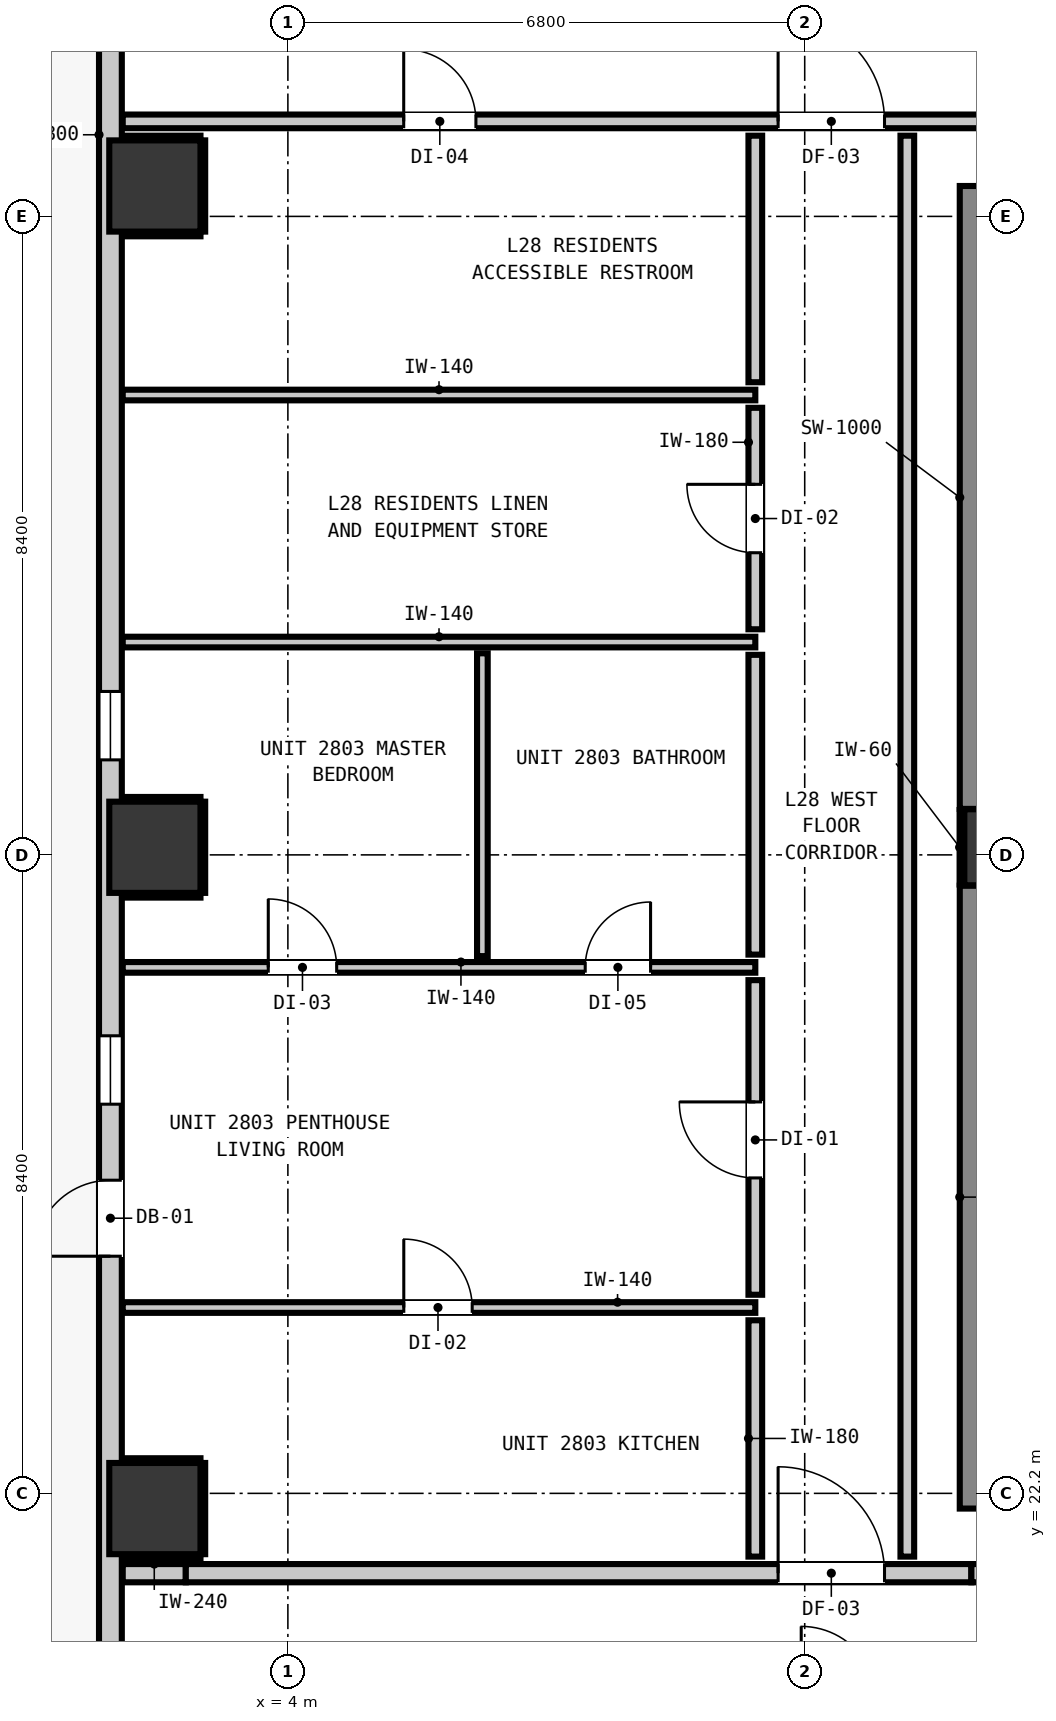
"""IFC4 building model, lengths in metres.
Left out: names, types, materials, properties, quantities, classifications, styles, units other than length and angle.
Written with IfcOpenShell. Run it as: python <this file> out.ifc"""

import sys

from ifc_helpers import new_model, si_unit, direction, frame, frame_2d, origin, origin_2d, place, context, subcontext, project, spatial, rectangle, extrude, element, fill, save


model = new_model("IFC4")
c1 = context("Model", 3, precision=1e-05, world=origin(), true_north=direction((0.0, 1.0)))
c2 = subcontext(c1, "Body", "Model", "MODEL_VIEW")
j1 = project(units=[si_unit("LENGTHUNIT", "METRE"), si_unit("PLANEANGLEUNIT", "RADIAN")], contexts=[c1])
p1 = place(None, origin())
s1 = spatial("IfcSite", under=j1, at=p1, CompositionType="ELEMENT")
p2 = place(p1, origin())
s2 = spatial("IfcBuilding", under=s1, at=p2, CompositionType="ELEMENT")
p3 = place(p2, frame((0.0, 0.0, 99.44)))
s3 = spatial("IfcBuildingStorey", under=s2, at=p3, CompositionType="ELEMENT", Elevation=99.44)
p4 = place(p3, frame((13.4, 30.7, 0.0), z_axis=(0.0, 0.0, 1.0), x_axis=(1.0, 0.0, 0.0)))
e1 = element("IfcColumn", 1, at=p4, inside=s3, PredefinedType="COLUMN", context=c2, shape_type="SweptSolid", body=[
    extrude(rectangle(XDim=1.0, YDim=1.0, at=origin_2d()), origin(), (0.0, 0.0, 1.0), 3.32),
])
p5 = place(p3, frame((13.34, 22.0, 0.0), z_axis=(0.0, 0.0, 1.0), x_axis=(0.0, 1.0, 0.0)))
e2 = element("IfcWall", 2, at=p5, inside=s3, PredefinedType="SHEAR", context=c2, shape_type="SweptSolid", body=[
    extrude(rectangle(XDim=8.195, YDim=1.0, at=frame_2d((4.098, 0.0))), origin(), (0.0, 0.0, 1.0), 3.32),
])
p6 = place(p3, frame((13.34, 31.205, 0.0), z_axis=(0.0, 0.0, 1.0), x_axis=(0.0, 1.0, 0.0)))
e3 = element("IfcWall", 3, at=p6, inside=s3, PredefinedType="SHEAR", context=c2, shape_type="SweptSolid", body=[
    extrude(rectangle(XDim=8.195, YDim=1.0, at=frame_2d((4.097, 0.0))), origin(), (0.0, 0.0, 1.0), 3.32),
])
for number, where, z_axis, x_axis in (
    (4, (2.25, 22.0, 0.0), (0.0, 0.0, 1.0), (1.0, 0.0, 0.0)),
    (5, (2.25, 30.7, 0.0), (0.0, 0.0, 1.0), (1.0, 0.0, 0.0)),
    (6, (2.25, 39.4, 0.0), (0.0, 0.0, 1.0), (1.0, 0.0, 0.0)),
):
    element("IfcColumn", number, at=place(p3, frame(where, z_axis=z_axis, x_axis=x_axis)), inside=s3, PredefinedType="COLUMN", context=c2, shape_type="SweptSolid", body=[
        extrude(rectangle(XDim=1.2, YDim=1.2, at=origin_2d()), origin(), (0.0, 0.0, 1.0), 3.32),
    ])
p7 = place(p3, frame((1.665, 16.365, 0.0), z_axis=(0.0, 0.0, 1.0), x_axis=(0.0, 1.0, 0.0)))
e7 = element("IfcWall", 7, at=p7, inside=s3, PredefinedType="STANDARD", context=c2, shape_type="SweptSolid", body=[
    extrude(rectangle(XDim=34.67, YDim=0.3, at=frame_2d((17.335, 0.0))), origin(), (0.0, 0.0, 1.0), 3.06),
])
p8 = place(p7, frame((8.955, 0.0, 0.0)))
e8 = element("IfcOpeningElement", 8, at=p8, cuts=e7, PredefinedType="OPENING", context=c2, shape_type="SweptSolid", body=[
    extrude(rectangle(XDim=1.0, YDim=2.15, at=frame_2d((0.5, 1.075))), frame((0.0, 0.16, 0.0), z_axis=(0.0, -1.0, 0.0), x_axis=(1.0, 0.0, 0.0)), (0.0, 0.0, 1.0), 0.32),
])
p9 = place(p7, frame((31.033, 0.0, 0.85)))
e9 = element("IfcOpeningElement", 9, at=p9, cuts=e7, PredefinedType="OPENING", context=c2, shape_type="SweptSolid", body=[
    extrude(rectangle(XDim=0.9, YDim=1.5, at=frame_2d((0.45, 0.75))), frame((0.0, 0.16, 0.0), z_axis=(0.0, -1.0, 0.0), x_axis=(1.0, 0.0, 0.0)), (0.0, 0.0, 1.0), 0.32),
])
p10 = place(p7, frame((10.955, 0.0, 0.85)))
e10 = element("IfcOpeningElement", 10, at=p10, cuts=e7, PredefinedType="OPENING", context=c2, shape_type="SweptSolid", body=[
    extrude(rectangle(XDim=0.9, YDim=1.5, at=frame_2d((0.45, 0.75))), frame((0.0, 0.16, 0.0), z_axis=(0.0, -1.0, 0.0), x_axis=(1.0, 0.0, 0.0)), (0.0, 0.0, 1.0), 0.32),
])
p11 = place(p7, frame((15.485, 0.0, 0.85)))
e11 = element("IfcOpeningElement", 11, at=p11, cuts=e7, PredefinedType="OPENING", context=c2, shape_type="SweptSolid", body=[
    extrude(rectangle(XDim=0.9, YDim=1.5, at=frame_2d((0.45, 0.75))), frame((0.0, 0.16, 0.0), z_axis=(0.0, -1.0, 0.0), x_axis=(1.0, 0.0, 0.0)), (0.0, 0.0, 1.0), 0.32),
])
p12 = place(p3, frame((1.827, 21.15, 0.0), z_axis=(0.0, 0.0, 1.0), x_axis=(1.0, 0.0, 0.0)))
e12 = element("IfcWall", 12, at=p12, inside=s3, PredefinedType="PARTITIONING", context=c2, shape_type="SweptSolid", body=[
    extrude(rectangle(XDim=0.83, YDim=0.24, at=frame_2d((0.415, 0.0))), origin(), (0.0, 0.0, 1.0), 3.06),
])
p13 = place(p3, frame((2.657, 21.15, 0.0), z_axis=(0.0, 0.0, 1.0), x_axis=(1.0, 0.0, 0.0)))
e13 = element("IfcWall", 13, at=p13, inside=s3, PredefinedType="PARTITIONING", context=c2, shape_type="SweptSolid", body=[
    extrude(rectangle(XDim=10.336, YDim=0.24, at=frame_2d((5.168, 0.0))), origin(), (0.0, 0.0, 1.0), 2.445),
])
p14 = place(p13, frame((7.793, 0.0, 0.0)))
e14 = element("IfcOpeningElement", 14, at=p14, cuts=e13, PredefinedType="OPENING", context=c2, shape_type="SweptSolid", body=[
    extrude(rectangle(XDim=1.4, YDim=2.15, at=frame_2d((0.7, 1.075))), frame((0.0, 0.13, 0.0), z_axis=(0.0, -1.0, 0.0), x_axis=(1.0, 0.0, 0.0)), (0.0, 0.0, 1.0), 0.26),
])
p15 = place(p3, frame((12.993, 21.15, 0.0), z_axis=(0.0, 0.0, 1.0), x_axis=(1.0, 0.0, 0.0)))
e15 = element("IfcWall", 15, at=p15, inside=s3, PredefinedType="PARTITIONING", context=c2, shape_type="SweptSolid", body=[
    extrude(rectangle(XDim=30.98, YDim=0.24, at=frame_2d((15.49, 0.0))), origin(), (0.0, 0.0, 1.0), 3.06),
])
p16 = place(p15, frame((5.217, 0.0, 0.0)))
e16 = element("IfcOpeningElement", 16, at=p16, cuts=e15, PredefinedType="OPENING", context=c2, shape_type="SweptSolid", body=[
    extrude(rectangle(XDim=1.1, YDim=2.15, at=frame_2d((0.55, 1.075))), frame((0.0, 0.13, 0.0), z_axis=(0.0, -1.0, 0.0), x_axis=(1.0, 0.0, 0.0)), (0.0, 0.0, 1.0), 0.26),
])
p17 = place(p15, frame((25.057, 0.0, 0.0)))
e17 = element("IfcOpeningElement", 17, at=p17, cuts=e15, PredefinedType="OPENING", context=c2, shape_type="SweptSolid", body=[
    extrude(rectangle(XDim=1.4, YDim=2.15, at=frame_2d((0.7, 1.075))), frame((0.0, 0.13, 0.0), z_axis=(0.0, -1.0, 0.0), x_axis=(1.0, 0.0, 0.0)), (0.0, 0.0, 1.0), 0.26),
])
p18 = place(p3, frame((1.827, 40.25, 0.0), z_axis=(0.0, 0.0, 1.0), x_axis=(1.0, 0.0, 0.0)))
e18 = element("IfcWall", 18, at=p18, inside=s3, PredefinedType="PARTITIONING", context=c2, shape_type="SweptSolid", body=[
    extrude(rectangle(XDim=42.146, YDim=0.18, at=frame_2d((21.073, 0.0))), origin(), (0.0, 0.0, 1.0), 3.06),
])
p19 = place(p18, frame((15.608, 0.0, 0.0)))
e19 = element("IfcOpeningElement", 19, at=p19, cuts=e18, PredefinedType="OPENING", context=c2, shape_type="SweptSolid", body=[
    extrude(rectangle(XDim=1.4, YDim=2.15, at=frame_2d((0.7, 1.075))), frame((0.0, 0.1, 0.0), z_axis=(0.0, -1.0, 0.0), x_axis=(1.0, 0.0, 0.0)), (0.0, 0.0, 1.0), 0.2),
])
p20 = place(p18, frame((8.623, 0.0, 0.0)))
e20 = element("IfcOpeningElement", 20, at=p20, cuts=e18, PredefinedType="OPENING", context=c2, shape_type="SweptSolid", body=[
    extrude(rectangle(XDim=1.4, YDim=2.15, at=frame_2d((0.7, 1.075))), frame((0.0, 0.1, 0.0), z_axis=(0.0, -1.0, 0.0), x_axis=(1.0, 0.0, 0.0)), (0.0, 0.0, 1.0), 0.2),
])
p21 = place(p18, frame((36.223, 0.0, 0.0)))
e21 = element("IfcOpeningElement", 21, at=p21, cuts=e18, PredefinedType="OPENING", context=c2, shape_type="SweptSolid", body=[
    extrude(rectangle(XDim=1.4, YDim=2.15, at=frame_2d((0.7, 1.075))), frame((0.0, 0.1, 0.0), z_axis=(0.0, -1.0, 0.0), x_axis=(1.0, 0.0, 0.0)), (0.0, 0.0, 1.0), 0.2),
])
p22 = place(p18, frame((3.697, 0.0, 0.0)))
e22 = element("IfcOpeningElement", 22, at=p22, cuts=e18, PredefinedType="OPENING", context=c2, shape_type="SweptSolid", body=[
    extrude(rectangle(XDim=0.95, YDim=2.1, at=frame_2d((0.475, 1.05))), frame((0.0, 0.1, 0.0), z_axis=(0.0, -1.0, 0.0), x_axis=(1.0, 0.0, 0.0)), (0.0, 0.0, 1.0), 0.2),
])
p23 = place(p18, frame((39.574, 0.0, 0.0)))
e23 = element("IfcOpeningElement", 23, at=p23, cuts=e18, PredefinedType="OPENING", context=c2, shape_type="SweptSolid", body=[
    extrude(rectangle(XDim=0.9, YDim=2.1, at=frame_2d((0.45, 1.05))), frame((0.0, 0.1, 0.0), z_axis=(0.0, -1.0, 0.0), x_axis=(1.0, 0.0, 0.0)), (0.0, 0.0, 1.0), 0.2),
])
p24 = place(p3, frame((1.827, 24.645, 0.0), z_axis=(0.0, 0.0, 1.0), x_axis=(1.0, 0.0, 0.0)))
e24 = element("IfcWall", 24, at=p24, inside=s3, PredefinedType="PARTITIONING", context=c2, shape_type="SweptSolid", body=[
    extrude(rectangle(XDim=8.323, YDim=0.14, at=frame_2d((4.162, 0.0))), origin(), (0.0, 0.0, 1.0), 3.06),
])
p25 = place(p24, frame((3.698, 0.0, 0.0)))
e25 = element("IfcOpeningElement", 25, at=p25, cuts=e24, PredefinedType="OPENING", context=c2, shape_type="SweptSolid", body=[
    extrude(rectangle(XDim=0.9, YDim=2.1, at=frame_2d((0.45, 1.05))), frame((0.0, 0.08, 0.0), z_axis=(0.0, -1.0, 0.0), x_axis=(1.0, 0.0, 0.0)), (0.0, 0.0, 1.0), 0.16),
])
p26 = place(p3, frame((1.827, 29.12, 0.0), z_axis=(0.0, 0.0, 1.0), x_axis=(1.0, 0.0, 0.0)))
e26 = element("IfcWall", 26, at=p26, inside=s3, PredefinedType="PARTITIONING", context=c2, shape_type="SweptSolid", body=[
    extrude(rectangle(XDim=8.323, YDim=0.14, at=frame_2d((4.162, 0.0))), origin(), (0.0, 0.0, 1.0), 3.06),
])
p27 = place(p26, frame((6.085, 0.0, 0.0)))
e27 = element("IfcOpeningElement", 27, at=p27, cuts=e26, PredefinedType="OPENING", context=c2, shape_type="SweptSolid", body=[
    extrude(rectangle(XDim=0.86, YDim=2.02, at=frame_2d((0.43, 1.01))), frame((0.0, 0.08, 0.0), z_axis=(0.0, -1.0, 0.0), x_axis=(1.0, 0.0, 0.0)), (0.0, 0.0, 1.0), 0.16),
])
p28 = place(p26, frame((1.915, 0.0, 0.0)))
e28 = element("IfcOpeningElement", 28, at=p28, cuts=e26, PredefinedType="OPENING", context=c2, shape_type="SweptSolid", body=[
    extrude(rectangle(XDim=0.9, YDim=2.1, at=frame_2d((0.45, 1.05))), frame((0.0, 0.08, 0.0), z_axis=(0.0, -1.0, 0.0), x_axis=(1.0, 0.0, 0.0)), (0.0, 0.0, 1.0), 0.16),
])
for number, where, z_axis, x_axis in (
    (29, (1.827, 33.4, 0.0), (0.0, 0.0, 1.0), (1.0, 0.0, 0.0)),
    (30, (1.827, 36.65, 0.0), (0.0, 0.0, 1.0), (1.0, 0.0, 0.0)),
):
    element("IfcWall", number, at=place(p3, frame(where, z_axis=z_axis, x_axis=x_axis)), inside=s3, PredefinedType="PARTITIONING", context=c2, shape_type="SweptSolid", body=[
        extrude(rectangle(XDim=8.323, YDim=0.14, at=frame_2d((4.162, 0.0))), origin(), (0.0, 0.0, 1.0), 3.06),
    ])
p29 = place(p3, frame((10.15, 21.368, 0.0), z_axis=(0.0, 0.0, 1.0), x_axis=(0.0, 1.0, 0.0)))
e31 = element("IfcWall", 31, at=p29, inside=s3, PredefinedType="PARTITIONING", context=c2, shape_type="SweptSolid", body=[
    extrude(rectangle(XDim=3.109, YDim=0.18, at=frame_2d((1.555, 0.0))), origin(), (0.0, 0.0, 1.0), 3.06),
])
p30 = place(p3, frame((10.15, 24.813, 0.0), z_axis=(0.0, 0.0, 1.0), x_axis=(0.0, 1.0, 0.0)))
e32 = element("IfcWall", 32, at=p30, inside=s3, PredefinedType="PARTITIONING", context=c2, shape_type="SweptSolid", body=[
    extrude(rectangle(XDim=4.139, YDim=0.18, at=frame_2d((2.069, 0.0))), origin(), (0.0, 0.0, 1.0), 3.06),
])
p31 = place(p30, frame((1.537, 0.0, 0.0)))
e33 = element("IfcOpeningElement", 33, at=p31, cuts=e32, PredefinedType="OPENING", context=c2, shape_type="SweptSolid", body=[
    extrude(rectangle(XDim=1.0, YDim=2.15, at=frame_2d((0.5, 1.075))), frame((0.0, 0.1, 0.0), z_axis=(0.0, -1.0, 0.0), x_axis=(1.0, 0.0, 0.0)), (0.0, 0.0, 1.0), 0.2),
])
p32 = place(p3, frame((10.15, 29.288, 0.0), z_axis=(0.0, 0.0, 1.0), x_axis=(0.0, 1.0, 0.0)))
e34 = element("IfcWall", 34, at=p32, inside=s3, PredefinedType="PARTITIONING", context=c2, shape_type="SweptSolid", body=[
    extrude(rectangle(XDim=3.944, YDim=0.18, at=frame_2d((1.972, 0.0))), origin(), (0.0, 0.0, 1.0), 3.06),
])
p33 = place(p3, frame((10.15, 33.568, 0.0), z_axis=(0.0, 0.0, 1.0), x_axis=(0.0, 1.0, 0.0)))
e35 = element("IfcWall", 35, at=p33, inside=s3, PredefinedType="PARTITIONING", context=c2, shape_type="SweptSolid", body=[
    extrude(rectangle(XDim=2.914, YDim=0.18, at=frame_2d((1.457, 0.0))), origin(), (0.0, 0.0, 1.0), 3.06),
])
p34 = place(p33, frame((1.007, 0.0, 0.0)))
e36 = element("IfcOpeningElement", 36, at=p34, cuts=e35, PredefinedType="OPENING", context=c2, shape_type="SweptSolid", body=[
    extrude(rectangle(XDim=0.9, YDim=2.1, at=frame_2d((0.45, 1.05))), frame((0.0, 0.1, 0.0), z_axis=(0.0, -1.0, 0.0), x_axis=(1.0, 0.0, 0.0)), (0.0, 0.0, 1.0), 0.2),
])
p35 = place(p3, frame((10.15, 36.818, 0.0), z_axis=(0.0, 0.0, 1.0), x_axis=(0.0, 1.0, 0.0)))
e37 = element("IfcWall", 37, at=p35, inside=s3, PredefinedType="PARTITIONING", context=c2, shape_type="SweptSolid", body=[
    extrude(rectangle(XDim=3.244, YDim=0.18, at=frame_2d((1.622, 0.0))), origin(), (0.0, 0.0, 1.0), 3.06),
])
p36 = place(p3, frame((12.15, 21.368, 0.0), z_axis=(0.0, 0.0, 1.0), x_axis=(0.0, 1.0, 0.0)))
e38 = element("IfcWall", 38, at=p36, inside=s3, PredefinedType="PARTITIONING", context=c2, shape_type="SweptSolid", body=[
    extrude(rectangle(XDim=18.694, YDim=0.18, at=frame_2d((9.347, 0.0))), origin(), (0.0, 0.0, 1.0), 3.06),
])
p37 = place(p3, frame((6.559, 29.268, 0.0), z_axis=(0.0, 0.0, 1.0), x_axis=(0.0, 1.0, 0.0)))
e39 = element("IfcWall", 39, at=p37, inside=s3, PredefinedType="PARTITIONING", context=c2, shape_type="SweptSolid", body=[
    extrude(rectangle(XDim=3.984, YDim=0.14, at=frame_2d((1.992, 0.0))), origin(), (0.0, 0.0, 1.0), 3.06),
])
p38 = place(p3, frame((12.868, 30.21, 0.0), z_axis=(0.0, 0.0, 1.0), x_axis=(0.0, 1.0, 0.0)))
e40 = element("IfcWall", 40, at=p38, inside=s3, PredefinedType="PARTITIONING", context=c2, shape_type="SweptSolid", body=[
    extrude(rectangle(XDim=0.98, YDim=0.06, at=frame_2d((0.49, 0.0))), origin(), (0.0, 0.0, 1.0), 1.45),
])
for number, where, z_axis, x_axis in (
    (41, (1.83, 21.368, 0.0), (0.0, 0.0, 1.0), (1.0, 0.0, 0.0)),
    (42, (1.83, 22.632, 0.0), (0.0, 0.0, 1.0), (1.0, 0.0, 0.0)),
):
    element("IfcWall", number, at=place(p3, frame(where, z_axis=z_axis, x_axis=x_axis)), inside=s3, PredefinedType="PARTITIONING", context=c2, shape_type="SweptSolid", body=[
        extrude(rectangle(XDim=1.02, YDim=0.06, at=frame_2d((0.51, 0.0))), origin(), (0.0, 0.0, 1.0), 1.45),
    ])
p39 = place(p3, frame((2.882, 21.4, 0.0), z_axis=(0.0, 0.0, 1.0), x_axis=(0.0, 1.0, 0.0)))
e43 = element("IfcWall", 43, at=p39, inside=s3, PredefinedType="PARTITIONING", context=c2, shape_type="SweptSolid", body=[
    extrude(rectangle(XDim=1.2, YDim=0.06, at=frame_2d((0.6, 0.0))), origin(), (0.0, 0.0, 1.0), 1.45),
])
for number, where, z_axis, x_axis in (
    (44, (1.83, 30.068, 0.0), (0.0, 0.0, 1.0), (1.0, 0.0, 0.0)),
    (45, (1.83, 31.332, 0.0), (0.0, 0.0, 1.0), (1.0, 0.0, 0.0)),
):
    element("IfcWall", number, at=place(p3, frame(where, z_axis=z_axis, x_axis=x_axis)), inside=s3, PredefinedType="PARTITIONING", context=c2, shape_type="SweptSolid", body=[
        extrude(rectangle(XDim=1.02, YDim=0.06, at=frame_2d((0.51, 0.0))), origin(), (0.0, 0.0, 1.0), 1.45),
    ])
p40 = place(p3, frame((2.882, 30.1, 0.0), z_axis=(0.0, 0.0, 1.0), x_axis=(0.0, 1.0, 0.0)))
e46 = element("IfcWall", 46, at=p40, inside=s3, PredefinedType="PARTITIONING", context=c2, shape_type="SweptSolid", body=[
    extrude(rectangle(XDim=1.2, YDim=0.06, at=frame_2d((0.6, 0.0))), origin(), (0.0, 0.0, 1.0), 1.45),
])
for number, where, z_axis, x_axis in (
    (47, (1.83, 38.768, 0.0), (0.0, 0.0, 1.0), (1.0, 0.0, 0.0)),
    (48, (1.83, 40.032, 0.0), (0.0, 0.0, 1.0), (1.0, 0.0, 0.0)),
):
    element("IfcWall", number, at=place(p3, frame(where, z_axis=z_axis, x_axis=x_axis)), inside=s3, PredefinedType="PARTITIONING", context=c2, shape_type="SweptSolid", body=[
        extrude(rectangle(XDim=1.02, YDim=0.06, at=frame_2d((0.51, 0.0))), origin(), (0.0, 0.0, 1.0), 1.45),
    ])
p41 = place(p3, frame((2.882, 38.8, 0.0), z_axis=(0.0, 0.0, 1.0), x_axis=(0.0, 1.0, 0.0)))
e49 = element("IfcWall", 49, at=p41, inside=s3, PredefinedType="PARTITIONING", context=c2, shape_type="SweptSolid", body=[
    extrude(rectangle(XDim=1.2, YDim=0.06, at=frame_2d((0.6, 0.0))), origin(), (0.0, 0.0, 1.0), 1.45),
])
p42 = place(p8, origin())
e50 = element("IfcDoor", 50, at=p42, inside=s3, OperationType="SINGLE_SWING_LEFT", PredefinedType="DOOR", context=c2, shape_type="SweptSolid", body=[
    extrude(rectangle(XDim=1.0, YDim=2.15, at=frame_2d((0.5, 1.075))), frame((0.0, 0.025, 0.0), z_axis=(0.0, -1.0, 0.0), x_axis=(1.0, 0.0, 0.0)), (0.0, 0.0, 1.0), 0.05),
])
fill(e8, e50)
p43 = place(p10, origin())
e51 = element("IfcWindow", 51, at=p43, inside=s3, PartitioningType="SINGLE_PANEL", PredefinedType="WINDOW", context=c2, shape_type="SweptSolid", body=[
    extrude(rectangle(XDim=0.9, YDim=1.5, at=frame_2d((0.45, 0.75))), frame((0.0, 0.03, 0.0), z_axis=(0.0, -1.0, 0.0), x_axis=(1.0, 0.0, 0.0)), (0.0, 0.0, 1.0), 0.06),
])
fill(e10, e51)
p44 = place(p11, origin())
e52 = element("IfcWindow", 52, at=p44, inside=s3, PartitioningType="SINGLE_PANEL", PredefinedType="WINDOW", context=c2, shape_type="SweptSolid", body=[
    extrude(rectangle(XDim=0.9, YDim=1.5, at=frame_2d((0.45, 0.75))), frame((0.0, 0.03, 0.0), z_axis=(0.0, -1.0, 0.0), x_axis=(1.0, 0.0, 0.0)), (0.0, 0.0, 1.0), 0.06),
])
fill(e11, e52)
p45 = place(p14, origin())
e53 = element("IfcDoor", 53, at=p45, inside=s3, OperationType="SINGLE_SWING_LEFT", PredefinedType="DOOR", context=c2, shape_type="SweptSolid", body=[
    extrude(rectangle(XDim=1.4, YDim=2.15, at=frame_2d((0.7, 1.075))), frame((0.0, 0.025, 0.0), z_axis=(0.0, -1.0, 0.0), x_axis=(1.0, 0.0, 0.0)), (0.0, 0.0, 1.0), 0.05),
])
fill(e14, e53)
p46 = place(p20, origin())
e54 = element("IfcDoor", 54, at=p46, inside=s3, OperationType="SINGLE_SWING_LEFT", PredefinedType="DOOR", context=c2, shape_type="SweptSolid", body=[
    extrude(rectangle(XDim=1.4, YDim=2.15, at=frame_2d((0.7, 1.075))), frame((0.0, 0.025, 0.0), z_axis=(0.0, -1.0, 0.0), x_axis=(1.0, 0.0, 0.0)), (0.0, 0.0, 1.0), 0.05),
])
fill(e20, e54)
p47 = place(p31, origin())
e55 = element("IfcDoor", 55, at=p47, inside=s3, OperationType="SINGLE_SWING_RIGHT", PredefinedType="DOOR", context=c2, shape_type="SweptSolid", body=[
    extrude(rectangle(XDim=1.0, YDim=2.15, at=frame_2d((0.5, 1.075))), frame((0.0, 0.025, 0.0), z_axis=(0.0, -1.0, 0.0), x_axis=(1.0, 0.0, 0.0)), (0.0, 0.0, 1.0), 0.05),
])
fill(e33, e55)
p48 = place(p25, origin())
e56 = element("IfcDoor", 56, at=p48, inside=s3, OperationType="SINGLE_SWING_LEFT", PredefinedType="DOOR", context=c2, shape_type="SweptSolid", body=[
    extrude(rectangle(XDim=0.9, YDim=2.1, at=frame_2d((0.45, 1.05))), frame((0.0, 0.025, 0.0), z_axis=(0.0, -1.0, 0.0), x_axis=(1.0, 0.0, 0.0)), (0.0, 0.0, 1.0), 0.05),
])
fill(e25, e56)
p49 = place(p27, origin())
e57 = element("IfcDoor", 57, at=p49, inside=s3, OperationType="SINGLE_SWING_RIGHT", PredefinedType="DOOR", context=c2, shape_type="SweptSolid", body=[
    extrude(rectangle(XDim=0.86, YDim=2.02, at=frame_2d((0.43, 1.01))), frame((0.0, 0.025, 0.0), z_axis=(0.0, -1.0, 0.0), x_axis=(1.0, 0.0, 0.0)), (0.0, 0.0, 1.0), 0.05),
])
fill(e27, e57)
p50 = place(p28, origin())
e58 = element("IfcDoor", 58, at=p50, inside=s3, OperationType="SINGLE_SWING_LEFT", PredefinedType="DOOR", context=c2, shape_type="SweptSolid", body=[
    extrude(rectangle(XDim=0.9, YDim=2.1, at=frame_2d((0.45, 1.05))), frame((0.0, 0.025, 0.0), z_axis=(0.0, -1.0, 0.0), x_axis=(1.0, 0.0, 0.0)), (0.0, 0.0, 1.0), 0.05),
])
fill(e28, e58)
p51 = place(p34, origin())
e59 = element("IfcDoor", 59, at=p51, inside=s3, OperationType="SINGLE_SWING_RIGHT", PredefinedType="DOOR", context=c2, shape_type="SweptSolid", body=[
    extrude(rectangle(XDim=0.9, YDim=2.1, at=frame_2d((0.45, 1.05))), frame((0.0, 0.025, 0.0), z_axis=(0.0, -1.0, 0.0), x_axis=(1.0, 0.0, 0.0)), (0.0, 0.0, 1.0), 0.05),
])
fill(e36, e59)
p52 = place(p22, origin())
e60 = element("IfcDoor", 60, at=p52, inside=s3, OperationType="SINGLE_SWING_LEFT", PredefinedType="DOOR", context=c2, shape_type="SweptSolid", body=[
    extrude(rectangle(XDim=0.95, YDim=2.1, at=frame_2d((0.475, 1.05))), frame((0.0, 0.025, 0.0), z_axis=(0.0, -1.0, 0.0), x_axis=(1.0, 0.0, 0.0)), (0.0, 0.0, 1.0), 0.05),
])
fill(e22, e60)
save(model, sys.argv[1])
